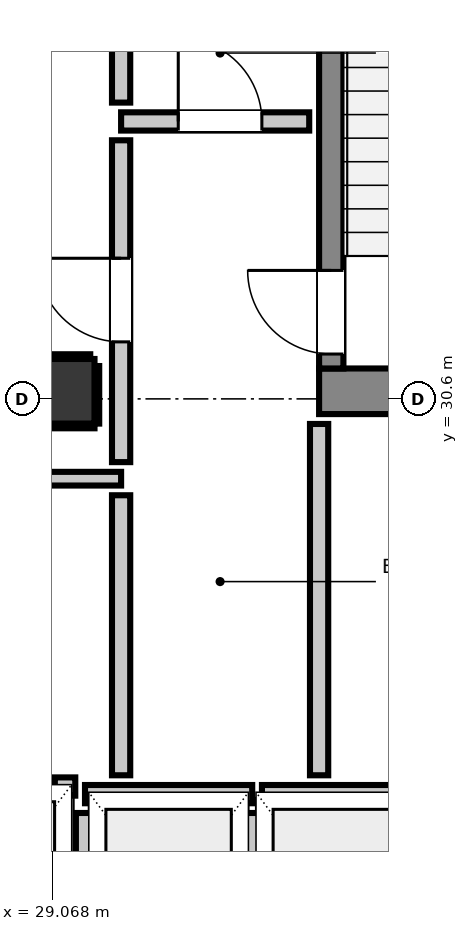
"""IFC4 building model, lengths in metres.
Left out: names, types, materials, properties, quantities, classifications, styles, units other than length and angle.
Written with IfcOpenShell. Run it as: python <this file> out.ifc"""

import sys

from ifc_helpers import new_model, si_unit, direction, frame, frame_2d, origin, origin_2d, place, context, subcontext, project, spatial, rectangle, extrude, element, fill, save


model = new_model("IFC4")
c1 = context("Model", 3, precision=1e-05, world=origin(), true_north=direction((0.0, 1.0)))
c2 = subcontext(c1, "Body", "Model", "MODEL_VIEW")
j1 = project(units=[si_unit("LENGTHUNIT", "METRE"), si_unit("PLANEANGLEUNIT", "RADIAN")], contexts=[c1])
p1 = place(None, origin())
s1 = spatial("IfcSite", under=j1, at=p1, CompositionType="ELEMENT")
p2 = place(p1, origin())
s2 = spatial("IfcBuilding", under=s1, at=p2, CompositionType="ELEMENT")
p3 = place(p2, frame((0.0, 0.0, 180.2)))
s3 = spatial("IfcBuildingStorey", under=s2, at=p3, CompositionType="ELEMENT", Elevation=180.2)
p4 = place(p3, frame((32.58, 30.7, 0.0), z_axis=(0.0, 0.0, 1.0), x_axis=(1.0, 0.0, 0.0)))
e1 = element("IfcWall", 1, at=p4, inside=s3, PredefinedType="SHEAR", context=c2, shape_type="SweptSolid", body=[
    extrude(rectangle(XDim=3.54, YDim=0.6, at=frame_2d((1.77, 0.0))), origin(), (0.0, 0.0, 1.0), 3.32),
])
p5 = place(p3, frame((32.74, 31.0, 0.0), z_axis=(0.0, 0.0, 1.0), x_axis=(0.0, 1.0, 0.0)))
e2 = element("IfcWall", 2, at=p5, inside=s3, PredefinedType="SHEAR", context=c2, shape_type="SweptSolid", body=[
    extrude(rectangle(XDim=7.8, YDim=0.32, at=frame_2d((3.9, 0.0))), origin(), (0.0, 0.0, 1.0), 3.32),
])
p6 = place(p5, frame((0.19, 0.0, 0.0)))
e3 = element("IfcOpeningElement", 3, at=p6, cuts=e2, PredefinedType="OPENING", context=c2, shape_type="SweptSolid", body=[
    extrude(rectangle(XDim=1.1, YDim=2.15, at=frame_2d((0.55, 1.075))), frame((0.0, 0.17, 0.0), z_axis=(0.0, -1.0, 0.0), x_axis=(1.0, 0.0, 0.0)), (0.0, 0.0, 1.0), 0.34),
])
p7 = place(p3, frame((29.2, 30.7, 0.0), z_axis=(0.0, 0.0, 1.0), x_axis=(1.0, 0.0, 0.0)))
e4 = element("IfcColumn", 4, at=p7, inside=s3, PredefinedType="COLUMN", context=c2, shape_type="SweptSolid", body=[
    extrude(rectangle(XDim=0.85, YDim=0.85, at=origin_2d()), origin(), (0.0, 0.0, 1.0), 3.32),
])
p8 = place(p3, frame((29.5, 25.4, 0.0), z_axis=(0.0, 0.0, 1.0), x_axis=(1.0, 0.0, 0.0)))
e5 = element("IfcWall", 5, at=p8, inside=s3, PredefinedType="PARTITIONING", context=c2, shape_type="SweptSolid", body=[
    extrude(rectangle(XDim=2.2, YDim=0.24, at=frame_2d((1.1, 0.0))), origin(), (0.0, 0.0, 1.0), 3.08),
])
p9 = place(p3, frame((29.5, 22.848, 0.0), z_axis=(0.0, 0.0, 1.0), x_axis=(0.0, 1.0, 0.0)))
e6 = element("IfcWall", 6, at=p9, inside=s3, PredefinedType="PARTITIONING", context=c2, shape_type="SweptSolid", body=[
    extrude(rectangle(XDim=2.304, YDim=0.24, at=frame_2d((1.152, 0.0))), origin(), (0.0, 0.0, 1.0), 2.315),
])
p10 = place(p3, frame((31.7, 22.848, 0.0), z_axis=(0.0, 0.0, 1.0), x_axis=(0.0, 1.0, 0.0)))
e7 = element("IfcWall", 7, at=p10, inside=s3, PredefinedType="PARTITIONING", context=c2, shape_type="SweptSolid", body=[
    extrude(rectangle(XDim=2.304, YDim=0.24, at=frame_2d((1.152, 0.0))), origin(), (0.0, 0.0, 1.0), 3.08),
])
p11 = place(p3, frame((31.828, 25.4, 0.0), z_axis=(0.0, 0.0, 1.0), x_axis=(1.0, 0.0, 0.0)))
e8 = element("IfcWall", 8, at=p11, inside=s3, PredefinedType="PARTITIONING", context=c2, shape_type="SweptSolid", body=[
    extrude(rectangle(XDim=2.072, YDim=0.24, at=frame_2d((1.036, 0.0))), origin(), (0.0, 0.0, 1.0), 3.08),
])
p12 = place(p3, frame((29.103, 25.5, 0.0), z_axis=(0.0, 0.0, 1.0), x_axis=(1.0, 0.0, 0.0)))
e9 = element("IfcWall", 9, at=p12, inside=s3, PredefinedType="PARTITIONING", context=c2, shape_type="SweptSolid", body=[
    extrude(rectangle(XDim=0.269, YDim=0.24, at=frame_2d((0.135, 0.0))), origin(), (0.0, 0.0, 1.0), 3.08),
])
p13 = place(p3, frame((29.975, 34.25, 0.0), z_axis=(0.0, 0.0, 1.0), x_axis=(1.0, 0.0, 0.0)))
e10 = element("IfcWall", 10, at=p13, inside=s3, PredefinedType="PARTITIONING", context=c2, shape_type="SweptSolid", body=[
    extrude(rectangle(XDim=2.475, YDim=0.24, at=frame_2d((1.237, 0.0))), origin(), (0.0, 0.0, 1.0), 3.08),
])
p14 = place(p13, frame((0.752, 0.0, 0.0)))
e11 = element("IfcOpeningElement", 11, at=p14, cuts=e10, PredefinedType="OPENING", context=c2, shape_type="SweptSolid", body=[
    extrude(rectangle(XDim=1.1, YDim=2.15, at=frame_2d((0.55, 1.075))), frame((0.0, 0.13, 0.0), z_axis=(0.0, -1.0, 0.0), x_axis=(1.0, 0.0, 0.0)), (0.0, 0.0, 1.0), 0.26),
])
p15 = place(p3, frame((28.593, 29.55, 0.0), z_axis=(0.0, 0.0, 1.0), x_axis=(1.0, 0.0, 0.0)))
e12 = element("IfcWall", 12, at=p15, inside=s3, PredefinedType="PARTITIONING", context=c2, shape_type="SweptSolid", body=[
    extrude(rectangle(XDim=1.382, YDim=0.18, at=frame_2d((0.691, 0.0))), origin(), (0.0, 0.0, 1.0), 3.08),
])
p16 = place(p3, frame((29.975, 25.648, 0.0), z_axis=(0.0, 0.0, 1.0), x_axis=(0.0, 1.0, 0.0)))
e13 = element("IfcWall", 13, at=p16, inside=s3, PredefinedType="PARTITIONING", context=c2, shape_type="SweptSolid", body=[
    extrude(rectangle(XDim=3.684, YDim=0.24, at=frame_2d((1.842, 0.0))), origin(), (0.0, 0.0, 1.0), 3.08),
])
p17 = place(p3, frame((29.975, 29.768, 0.0), z_axis=(0.0, 0.0, 1.0), x_axis=(0.0, 1.0, 0.0)))
e14 = element("IfcWall", 14, at=p17, inside=s3, PredefinedType="PARTITIONING", context=c2, shape_type="SweptSolid", body=[
    extrude(rectangle(XDim=4.234, YDim=0.24, at=frame_2d((2.117, 0.0))), origin(), (0.0, 0.0, 1.0), 3.08),
])
p18 = place(p17, frame((1.582, 0.0, 0.0)))
e15 = element("IfcOpeningElement", 15, at=p18, cuts=e14, PredefinedType="OPENING", context=c2, shape_type="SweptSolid", body=[
    extrude(rectangle(XDim=1.1, YDim=2.15, at=frame_2d((0.55, 1.075))), frame((0.0, 0.13, 0.0), z_axis=(0.0, -1.0, 0.0), x_axis=(1.0, 0.0, 0.0)), (0.0, 0.0, 1.0), 0.26),
])
p19 = place(p3, frame((29.975, 34.498, 0.0), z_axis=(0.0, 0.0, 1.0), x_axis=(0.0, 1.0, 0.0)))
e16 = element("IfcWall", 16, at=p19, inside=s3, PredefinedType="PARTITIONING", context=c2, shape_type="SweptSolid", body=[
    extrude(rectangle(XDim=0.924, YDim=0.24, at=frame_2d((0.462, 0.0))), origin(), (0.0, 0.0, 1.0), 3.08),
])
p20 = place(p3, frame((32.58, 25.648, 0.0), z_axis=(0.0, 0.0, 1.0), x_axis=(0.0, 1.0, 0.0)))
e17 = element("IfcWall", 17, at=p20, inside=s3, PredefinedType="PARTITIONING", context=c2, shape_type="SweptSolid", body=[
    extrude(rectangle(XDim=4.622, YDim=0.24, at=frame_2d((2.311, 0.0))), origin(), (0.0, 0.0, 1.0), 3.08),
])
p21 = place(p3, frame((28.775, 30.243, 0.0), z_axis=(0.0, 0.0, 1.0), x_axis=(1.0, 0.0, 0.0)))
e18 = element("IfcWall", 18, at=p21, inside=s3, PredefinedType="PARTITIONING", context=c2, shape_type="SweptSolid", body=[
    extrude(rectangle(XDim=0.85, YDim=0.06, at=frame_2d((0.425, 0.0))), origin(), (0.0, 0.0, 1.0), 1.45),
])
p22 = place(p3, frame((28.775, 31.157, 0.0), z_axis=(0.0, 0.0, 1.0), x_axis=(1.0, 0.0, 0.0)))
e19 = element("IfcWall", 19, at=p22, inside=s3, PredefinedType="PARTITIONING", context=c2, shape_type="SweptSolid", body=[
    extrude(rectangle(XDim=0.794, YDim=0.06, at=frame_2d((0.397, 0.0))), origin(), (0.0, 0.0, 1.0), 1.45),
])
p23 = place(p3, frame((29.657, 30.275, 0.0), z_axis=(0.0, 0.0, 1.0), x_axis=(0.0, 1.0, 0.0)))
e20 = element("IfcWall", 20, at=p23, inside=s3, PredefinedType="PARTITIONING", context=c2, shape_type="SweptSolid", body=[
    extrude(rectangle(XDim=0.757, YDim=0.06, at=frame_2d((0.378, 0.0))), origin(), (0.0, 0.0, 1.0), 1.45),
])
p24 = place(p6, origin())
e21 = element("IfcDoor", 21, at=p24, inside=s3, OperationType="SINGLE_SWING_RIGHT", PredefinedType="DOOR", context=c2, shape_type="SweptSolid", body=[
    extrude(rectangle(XDim=1.1, YDim=2.15, at=frame_2d((0.55, 1.075))), frame((0.0, 0.025, 0.0), z_axis=(0.0, -1.0, 0.0), x_axis=(1.0, 0.0, 0.0)), (0.0, 0.0, 1.0), 0.05),
])
fill(e3, e21)
p25 = place(p18, origin())
e22 = element("IfcDoor", 22, at=p25, inside=s3, OperationType="SINGLE_SWING_RIGHT", PredefinedType="DOOR", context=c2, shape_type="SweptSolid", body=[
    extrude(rectangle(XDim=1.1, YDim=2.15, at=frame_2d((0.55, 1.075))), frame((0.0, 0.025, 0.0), z_axis=(0.0, -1.0, 0.0), x_axis=(1.0, 0.0, 0.0)), (0.0, 0.0, 1.0), 0.05),
])
fill(e15, e22)
p26 = place(p14, origin())
e23 = element("IfcDoor", 23, at=p26, inside=s3, OperationType="SINGLE_SWING_LEFT", PredefinedType="DOOR", context=c2, shape_type="SweptSolid", body=[
    extrude(rectangle(XDim=1.1, YDim=2.15, at=frame_2d((0.55, 1.075))), frame((0.0, 0.025, 0.0), z_axis=(0.0, -1.0, 0.0), x_axis=(1.0, 0.0, 0.0)), (0.0, 0.0, 1.0), 0.05),
])
fill(e11, e23)
save(model, sys.argv[1])
